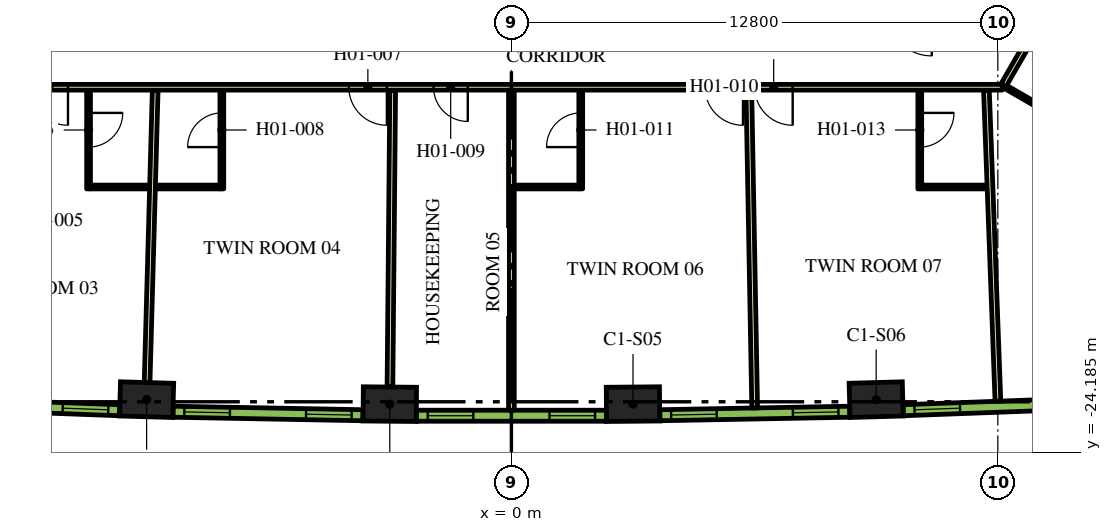
"""IFC4 building model, lengths in metres.
Left out: names, types, materials, properties, quantities, classifications, styles, units other than length and angle.
Written with IfcOpenShell. Run it as: python <this file> out.ifc"""

import sys

from ifc_helpers import new_model, si_unit, direction, frame, frame_2d, origin, origin_2d, place, context, subcontext, project, spatial, rectangle, extrude, element, fill, save


model = new_model("IFC4")
c1 = context("Model", 3, precision=1e-05, world=origin(), true_north=direction((0.0, 1.0)))
c2 = subcontext(c1, "Body", "Model", "MODEL_VIEW")
j1 = project(units=[si_unit("LENGTHUNIT", "METRE"), si_unit("PLANEANGLEUNIT", "RADIAN")], contexts=[c1])
p1 = place(None, origin())
s1 = spatial("IfcSite", under=j1, at=p1, CompositionType="ELEMENT")
p2 = place(p1, origin())
s2 = spatial("IfcBuilding", under=s1, at=p2, CompositionType="ELEMENT")
p3 = place(p2, frame((0.0, 0.0, 31.5)))
s3 = spatial("IfcBuildingStorey", under=s2, at=p3, CompositionType="ELEMENT", Elevation=31.5)
for number, where, z_axis, x_axis in (
    (1, (-9.599, -22.795, 0.0), (0.0, 0.0, 1.0), (1.0, -0.028, 0.0)),
    (2, (-3.2, -22.913, 0.0), (0.0, 0.0, 1.0), (1.0, -0.009, 0.0)),
    (3, (3.2, -22.913, 0.0), (0.0, 0.0, 1.0), (1.0, 0.009, 0.0)),
    (4, (9.599, -22.795, 0.0), (0.0, 0.0, 1.0), (1.0, 0.028, 0.0)),
):
    element("IfcColumn", number, at=place(p3, frame(where, z_axis=z_axis, x_axis=x_axis)), inside=s3, PredefinedType="COLUMN", context=c2, shape_type="SweptSolid", body=[
        extrude(rectangle(XDim=1.4, YDim=0.9, at=origin_2d()), origin(), (0.0, 0.0, 1.0), 3.9),
    ])
p4 = place(p3, frame((12.918, -14.575, 0.0), z_axis=(0.0, 0.0, 1.0), x_axis=(-1.0, 0.0, 0.0)))
e5 = element("IfcWall", 5, at=p4, inside=s3, PredefinedType="PARTITIONING", context=c2, shape_type="SweptSolid", body=[
    extrude(rectangle(XDim=25.766, YDim=0.15, at=frame_2d((12.883, 0.0))), origin(), (0.0, 0.0, 1.0), 2.75),
])
p5 = place(p4, frame((24.586, 0.0, 0.0)))
e6 = element("IfcOpeningElement", 6, at=p5, cuts=e5, PredefinedType="OPENING", context=c2, shape_type="SweptSolid", body=[
    extrude(rectangle(XDim=1.0, YDim=2.1, at=frame_2d((0.5, 1.05))), frame((0.0, 0.085, 0.0), z_axis=(0.0, -1.0, 0.0), x_axis=(1.0, 0.0, 0.0)), (0.0, 0.0, 1.0), 0.17),
])
p6 = place(p4, frame((16.195, 0.0, 0.0)))
e7 = element("IfcOpeningElement", 7, at=p6, cuts=e5, PredefinedType="OPENING", context=c2, shape_type="SweptSolid", body=[
    extrude(rectangle(XDim=1.0, YDim=2.1, at=frame_2d((0.5, 1.05))), frame((0.0, 0.085, 0.0), z_axis=(0.0, -1.0, 0.0), x_axis=(1.0, 0.0, 0.0)), (0.0, 0.0, 1.0), 0.17),
])
p7 = place(p4, frame((14.066, 0.0, 0.0)))
e8 = element("IfcOpeningElement", 8, at=p7, cuts=e5, PredefinedType="OPENING", context=c2, shape_type="SweptSolid", body=[
    extrude(rectangle(XDim=0.9, YDim=2.1, at=frame_2d((0.45, 1.05))), frame((0.0, 0.085, 0.0), z_axis=(0.0, -1.0, 0.0), x_axis=(1.0, 0.0, 0.0)), (0.0, 0.0, 1.0), 0.17),
])
p8 = place(p4, frame((6.824, 0.0, 0.0)))
e9 = element("IfcOpeningElement", 9, at=p8, cuts=e5, PredefinedType="OPENING", context=c2, shape_type="SweptSolid", body=[
    extrude(rectangle(XDim=1.0, YDim=2.1, at=frame_2d((0.5, 1.05))), frame((0.0, 0.085, 0.0), z_axis=(0.0, -1.0, 0.0), x_axis=(1.0, 0.0, 0.0)), (0.0, 0.0, 1.0), 0.17),
])
p9 = place(p4, frame((5.517, 0.0, 0.0)))
e10 = element("IfcOpeningElement", 10, at=p9, cuts=e5, PredefinedType="OPENING", context=c2, shape_type="SweptSolid", body=[
    extrude(rectangle(XDim=1.0, YDim=2.1, at=frame_2d((0.5, 1.05))), frame((0.0, 0.085, 0.0), z_axis=(0.0, -1.0, 0.0), x_axis=(1.0, 0.0, 0.0)), (0.0, 0.0, 1.0), 0.17),
])
p10 = place(p3, frame((15.587, -9.952, 0.0), z_axis=(0.0, 0.0, 1.0), x_axis=(-0.500016618951, -0.866015808616, 0.0)))
e11 = element("IfcWall", 11, at=p10, inside=s3, PredefinedType="PARTITIONING", context=c2, shape_type="SweptSolid", body=[
    extrude(rectangle(XDim=5.268, YDim=0.15, at=frame_2d((2.634, 0.0))), origin(), (0.0, 0.0, 1.0), 2.75),
])
p11 = place(p10, frame((0.225, 0.0, 0.0)))
e12 = element("IfcOpeningElement", 12, at=p11, cuts=e11, PredefinedType="OPENING", context=c2, shape_type="SweptSolid", body=[
    extrude(rectangle(XDim=1.0, YDim=2.1, at=frame_2d((0.5, 1.05))), frame((0.0, 0.085, 0.0), z_axis=(0.0, -1.0, 0.0), x_axis=(1.0, 0.0, 0.0)), (0.0, 0.0, 1.0), 0.17),
])
p12 = place(p3, frame((-9.586, -22.345, 0.0), z_axis=(0.0, 0.0, 1.0), x_axis=(0.027722115646, 0.999615668297, 0.0)))
e13 = element("IfcWall", 13, at=p12, inside=s3, PredefinedType="PARTITIONING", context=c2, shape_type="SweptSolid", body=[
    extrude(rectangle(XDim=7.688, YDim=0.15, at=frame_2d((3.844, 0.0))), origin(), (0.0, 0.0, 1.0), 2.75),
])
p13 = place(p3, frame((-3.196, -22.463, 0.0), z_axis=(0.0, 0.0, 1.0), x_axis=(0.00926060032, 0.999957119721, 0.0)))
e14 = element("IfcWall", 14, at=p13, inside=s3, PredefinedType="PARTITIONING", context=c2, shape_type="SweptSolid", body=[
    extrude(rectangle(XDim=7.803, YDim=0.15, at=frame_2d((3.902, 0.0))), origin(), (0.0, 0.0, 1.0), 2.75),
])
p14 = place(p3, frame((0.0, -23.073, 0.0), z_axis=(0.0, 0.0, 1.0), x_axis=(0.0, 1.0, 0.0)))
e15 = element("IfcWall", 15, at=p14, inside=s3, PredefinedType="PARTITIONING", context=c2, shape_type="SweptSolid", body=[
    extrude(rectangle(XDim=8.423, YDim=0.15, at=frame_2d((4.212, 0.0))), origin(), (0.0, 0.0, 1.0), 2.75),
])
p15 = place(p3, frame((6.402, -23.014, 0.0), z_axis=(0.0, 0.0, 1.0), x_axis=(-0.01849587109, 0.999828936745, 0.0)))
e16 = element("IfcWall", 16, at=p15, inside=s3, PredefinedType="PARTITIONING", context=c2, shape_type="SweptSolid", body=[
    extrude(rectangle(XDim=8.355, YDim=0.15, at=frame_2d((4.178, 0.0))), origin(), (0.0, 0.0, 1.0), 2.75),
])
p16 = place(p3, frame((12.802, -22.836, 0.0), z_axis=(0.0, 0.0, 1.0), x_axis=(-0.036969723281, 0.999316386116, 0.0)))
e17 = element("IfcWall", 17, at=p16, inside=s3, PredefinedType="PARTITIONING", context=c2, shape_type="SweptSolid", body=[
    extrude(rectangle(XDim=8.182, YDim=0.15, at=frame_2d((4.091, 0.0))), origin(), (0.0, 0.0, 1.0), 2.75),
])
p17 = place(p3, frame((-11.127, -14.65, 0.0), z_axis=(0.0, 0.0, 1.0), x_axis=(0.0, -1.0, 0.0)))
e18 = element("IfcWall", 18, at=p17, inside=s3, PredefinedType="PARTITIONING", context=c2, shape_type="SweptSolid", body=[
    extrude(rectangle(XDim=2.6, YDim=0.1, at=frame_2d((1.3, 0.0))), origin(), (0.0, 0.0, 1.0), 2.75),
])
p18 = place(p17, frame((0.6, 0.0, 0.0)))
e19 = element("IfcOpeningElement", 19, at=p18, cuts=e18, PredefinedType="OPENING", context=c2, shape_type="SweptSolid", body=[
    extrude(rectangle(XDim=0.9, YDim=2.1, at=frame_2d((0.45, 1.05))), frame((0.0, 0.06, 0.0), z_axis=(0.0, -1.0, 0.0), x_axis=(1.0, 0.0, 0.0)), (0.0, 0.0, 1.0), 0.12),
])
p19 = place(p3, frame((-11.077, -17.2, 0.0), z_axis=(0.0, 0.0, 1.0), x_axis=(1.0, 0.0, 0.0)))
e20 = element("IfcWall", 20, at=p19, inside=s3, PredefinedType="PARTITIONING", context=c2, shape_type="SweptSolid", body=[
    extrude(rectangle(XDim=1.55, YDim=0.1, at=frame_2d((0.775, 0.0))), origin(), (0.0, 0.0, 1.0), 2.75),
])
p20 = place(p3, frame((-7.619, -17.25, 0.0), z_axis=(0.0, 0.0, 1.0), x_axis=(0.0, 1.0, 0.0)))
e21 = element("IfcWall", 21, at=p20, inside=s3, PredefinedType="PARTITIONING", context=c2, shape_type="SweptSolid", body=[
    extrude(rectangle(XDim=2.6, YDim=0.1, at=frame_2d((1.3, 0.0))), origin(), (0.0, 0.0, 1.0), 2.75),
])
p21 = place(p20, frame((1.1, 0.0, 0.0)))
e22 = element("IfcOpeningElement", 22, at=p21, cuts=e21, PredefinedType="OPENING", context=c2, shape_type="SweptSolid", body=[
    extrude(rectangle(XDim=0.9, YDim=2.1, at=frame_2d((0.45, 1.05))), frame((0.0, 0.06, 0.0), z_axis=(0.0, -1.0, 0.0), x_axis=(1.0, 0.0, 0.0)), (0.0, 0.0, 1.0), 0.12),
])
p22 = place(p3, frame((-7.669, -17.2, 0.0), z_axis=(0.0, 0.0, 1.0), x_axis=(-1.0, 0.0, 0.0)))
e23 = element("IfcWall", 23, at=p22, inside=s3, PredefinedType="PARTITIONING", context=c2, shape_type="SweptSolid", body=[
    extrude(rectangle(XDim=1.69, YDim=0.1, at=frame_2d((0.845, 0.0))), origin(), (0.0, 0.0, 1.0), 2.75),
])
p23 = place(p3, frame((1.825, -17.25, 0.0), z_axis=(0.0, 0.0, 1.0), x_axis=(0.0, 1.0, 0.0)))
e24 = element("IfcWall", 24, at=p23, inside=s3, PredefinedType="PARTITIONING", context=c2, shape_type="SweptSolid", body=[
    extrude(rectangle(XDim=2.6, YDim=0.1, at=frame_2d((1.3, 0.0))), origin(), (0.0, 0.0, 1.0), 2.75),
])
p24 = place(p23, frame((1.1, 0.0, 0.0)))
e25 = element("IfcOpeningElement", 25, at=p24, cuts=e24, PredefinedType="OPENING", context=c2, shape_type="SweptSolid", body=[
    extrude(rectangle(XDim=0.9, YDim=2.1, at=frame_2d((0.45, 1.05))), frame((0.0, 0.06, 0.0), z_axis=(0.0, -1.0, 0.0), x_axis=(1.0, 0.0, 0.0)), (0.0, 0.0, 1.0), 0.12),
])
p25 = place(p3, frame((1.775, -17.2, 0.0), z_axis=(0.0, 0.0, 1.0), x_axis=(-1.0, 0.0, 0.0)))
e26 = element("IfcWall", 26, at=p25, inside=s3, PredefinedType="PARTITIONING", context=c2, shape_type="SweptSolid", body=[
    extrude(rectangle(XDim=1.7, YDim=0.1, at=frame_2d((0.85, 0.0))), origin(), (0.0, 0.0, 1.0), 2.75),
])
p26 = place(p3, frame((10.746, -14.65, 0.0), z_axis=(0.0, 0.0, 1.0), x_axis=(0.0, -1.0, 0.0)))
e27 = element("IfcWall", 27, at=p26, inside=s3, PredefinedType="PARTITIONING", context=c2, shape_type="SweptSolid", body=[
    extrude(rectangle(XDim=2.6, YDim=0.1, at=frame_2d((1.3, 0.0))), origin(), (0.0, 0.0, 1.0), 2.75),
])
p27 = place(p26, frame((0.6, 0.0, 0.0)))
e28 = element("IfcOpeningElement", 28, at=p27, cuts=e27, PredefinedType="OPENING", context=c2, shape_type="SweptSolid", body=[
    extrude(rectangle(XDim=0.9, YDim=2.1, at=frame_2d((0.45, 1.05))), frame((0.0, 0.06, 0.0), z_axis=(0.0, -1.0, 0.0), x_axis=(1.0, 0.0, 0.0)), (0.0, 0.0, 1.0), 0.12),
])
p28 = place(p3, frame((10.806, -17.2, 0.0), z_axis=(0.0, 0.0, 1.0), x_axis=(1.0, 0.0, 0.0)))
e29 = element("IfcWall", 29, at=p28, inside=s3, PredefinedType="PARTITIONING", context=c2, shape_type="SweptSolid", body=[
    extrude(rectangle(XDim=1.71, YDim=0.1, at=frame_2d((0.855, 0.0))), origin(), (0.0, 0.0, 1.0), 2.75),
])
p29 = place(p3, frame((13.008, -14.569, 0.0), z_axis=(0.0, 0.0, 1.0), x_axis=(0.865997922154, -0.500047596559, 0.0)))
e30 = element("IfcWall", 30, at=p29, inside=s3, PredefinedType="PARTITIONING", context=c2, shape_type="SweptSolid", body=[
    extrude(rectangle(XDim=2.6, YDim=0.1, at=frame_2d((1.3, 0.0))), origin(), (0.0, 0.0, 1.0), 2.75),
])
p30 = place(p3, frame((-15.305, -22.889, 0.0), z_axis=(0.0, 0.0, 1.0), x_axis=(0.999317974969, -0.036926750529, 0.0)))
e31 = element("IfcWall", 31, at=p30, inside=s3, PredefinedType="SOLIDWALL", context=c2, shape_type="SweptSolid", body=[
    extrude(rectangle(XDim=4.998, YDim=0.29, at=frame_2d((2.499, 0.0))), origin(), (0.0, 0.0, 1.0), 3.65),
])
p31 = place(p30, frame((0.297, 0.0, 0.9)))
e32 = element("IfcOpeningElement", 32, at=p31, cuts=e31, PredefinedType="OPENING", context=c2, shape_type="SweptSolid", body=[
    extrude(rectangle(XDim=1.2, YDim=2.15, at=frame_2d((0.6, 1.075))), frame((0.0, 0.155, 0.0), z_axis=(0.0, -1.0, 0.0), x_axis=(1.0, 0.0, 0.0)), (0.0, 0.0, 1.0), 0.31),
])
p32 = place(p30, frame((3.501, 0.0, 0.9)))
e33 = element("IfcOpeningElement", 33, at=p32, cuts=e31, PredefinedType="OPENING", context=c2, shape_type="SweptSolid", body=[
    extrude(rectangle(XDim=1.2, YDim=2.15, at=frame_2d((0.6, 1.075))), frame((0.0, 0.155, 0.0), z_axis=(0.0, -1.0, 0.0), x_axis=(1.0, 0.0, 0.0)), (0.0, 0.0, 1.0), 0.31),
])
p33 = place(p3, frame((-8.904, -23.113, 0.0), z_axis=(0.0, 0.0, 1.0), x_axis=(0.999829529479, -0.018463801951, 0.0)))
e34 = element("IfcWall", 34, at=p33, inside=s3, PredefinedType="SOLIDWALL", context=c2, shape_type="SweptSolid", body=[
    extrude(rectangle(XDim=4.998, YDim=0.29, at=frame_2d((2.499, 0.0))), origin(), (0.0, 0.0, 1.0), 3.65),
])
p34 = place(p33, frame((0.297, 0.0, 0.9)))
e35 = element("IfcOpeningElement", 35, at=p34, cuts=e34, PredefinedType="OPENING", context=c2, shape_type="SweptSolid", body=[
    extrude(rectangle(XDim=1.2, YDim=2.15, at=frame_2d((0.6, 1.075))), frame((0.0, 0.155, 0.0), z_axis=(0.0, -1.0, 0.0), x_axis=(1.0, 0.0, 0.0)), (0.0, 0.0, 1.0), 0.31),
])
p35 = place(p33, frame((3.501, 0.0, 0.9)))
e36 = element("IfcOpeningElement", 36, at=p35, cuts=e34, PredefinedType="OPENING", context=c2, shape_type="SweptSolid", body=[
    extrude(rectangle(XDim=1.2, YDim=2.15, at=frame_2d((0.6, 1.075))), frame((0.0, 0.155, 0.0), z_axis=(0.0, -1.0, 0.0), x_axis=(1.0, 0.0, 0.0)), (0.0, 0.0, 1.0), 0.31),
])
p36 = place(p3, frame((-2.499, -23.218, 0.0), z_axis=(0.0, 0.0, 1.0), x_axis=(1.0, 0.0, 0.0)))
e37 = element("IfcWall", 37, at=p36, inside=s3, PredefinedType="SOLIDWALL", context=c2, shape_type="SweptSolid", body=[
    extrude(rectangle(XDim=4.998, YDim=0.29, at=frame_2d((2.499, 0.0))), origin(), (0.0, 0.0, 1.0), 3.65),
])
p37 = place(p36, frame((0.297, 0.0, 0.9)))
e38 = element("IfcOpeningElement", 38, at=p37, cuts=e37, PredefinedType="OPENING", context=c2, shape_type="SweptSolid", body=[
    extrude(rectangle(XDim=1.2, YDim=2.15, at=frame_2d((0.6, 1.075))), frame((0.0, 0.155, 0.0), z_axis=(0.0, -1.0, 0.0), x_axis=(1.0, 0.0, 0.0)), (0.0, 0.0, 1.0), 0.31),
])
p38 = place(p36, frame((3.501, 0.0, 0.9)))
e39 = element("IfcOpeningElement", 39, at=p38, cuts=e37, PredefinedType="OPENING", context=c2, shape_type="SweptSolid", body=[
    extrude(rectangle(XDim=1.2, YDim=2.15, at=frame_2d((0.6, 1.075))), frame((0.0, 0.155, 0.0), z_axis=(0.0, -1.0, 0.0), x_axis=(1.0, 0.0, 0.0)), (0.0, 0.0, 1.0), 0.31),
])
p39 = place(p3, frame((3.906, -23.205, 0.0), z_axis=(0.0, 0.0, 1.0), x_axis=(0.999829529479, 0.018463801951, 0.0)))
e40 = element("IfcWall", 40, at=p39, inside=s3, PredefinedType="SOLIDWALL", context=c2, shape_type="SweptSolid", body=[
    extrude(rectangle(XDim=4.998, YDim=0.29, at=frame_2d((2.499, 0.0))), origin(), (0.0, 0.0, 1.0), 3.65),
])
p40 = place(p39, frame((0.297, 0.0, 0.9)))
e41 = element("IfcOpeningElement", 41, at=p40, cuts=e40, PredefinedType="OPENING", context=c2, shape_type="SweptSolid", body=[
    extrude(rectangle(XDim=1.2, YDim=2.15, at=frame_2d((0.6, 1.075))), frame((0.0, 0.155, 0.0), z_axis=(0.0, -1.0, 0.0), x_axis=(1.0, 0.0, 0.0)), (0.0, 0.0, 1.0), 0.31),
])
p41 = place(p39, frame((3.501, 0.0, 0.9)))
e42 = element("IfcOpeningElement", 42, at=p41, cuts=e40, PredefinedType="OPENING", context=c2, shape_type="SweptSolid", body=[
    extrude(rectangle(XDim=1.2, YDim=2.15, at=frame_2d((0.6, 1.075))), frame((0.0, 0.155, 0.0), z_axis=(0.0, -1.0, 0.0), x_axis=(1.0, 0.0, 0.0)), (0.0, 0.0, 1.0), 0.31),
])
p42 = place(p3, frame((10.31, -23.074, 0.0), z_axis=(0.0, 0.0, 1.0), x_axis=(0.999317974969, 0.036926750529, 0.0)))
e43 = element("IfcWall", 43, at=p42, inside=s3, PredefinedType="SOLIDWALL", context=c2, shape_type="SweptSolid", body=[
    extrude(rectangle(XDim=4.998, YDim=0.29, at=frame_2d((2.499, 0.0))), origin(), (0.0, 0.0, 1.0), 3.65),
])
p43 = place(p42, frame((0.297, 0.0, 0.9)))
e44 = element("IfcOpeningElement", 44, at=p43, cuts=e43, PredefinedType="OPENING", context=c2, shape_type="SweptSolid", body=[
    extrude(rectangle(XDim=1.2, YDim=2.15, at=frame_2d((0.6, 1.075))), frame((0.0, 0.155, 0.0), z_axis=(0.0, -1.0, 0.0), x_axis=(1.0, 0.0, 0.0)), (0.0, 0.0, 1.0), 0.31),
])
p44 = place(p42, frame((3.501, 0.0, 0.9)))
e45 = element("IfcOpeningElement", 45, at=p44, cuts=e43, PredefinedType="OPENING", context=c2, shape_type="SweptSolid", body=[
    extrude(rectangle(XDim=1.2, YDim=2.15, at=frame_2d((0.6, 1.075))), frame((0.0, 0.155, 0.0), z_axis=(0.0, -1.0, 0.0), x_axis=(1.0, 0.0, 0.0)), (0.0, 0.0, 1.0), 0.31),
])
p45 = place(p5, origin())
e46 = element("IfcDoor", 46, at=p45, inside=s3, OperationType="SINGLE_SWING_RIGHT", PredefinedType="DOOR", context=c2, shape_type="SweptSolid", body=[
    extrude(rectangle(XDim=1.0, YDim=2.1, at=frame_2d((0.5, 1.05))), frame((0.0, 0.025, 0.0), z_axis=(0.0, -1.0, 0.0), x_axis=(1.0, 0.0, 0.0)), (0.0, 0.0, 1.0), 0.05),
])
fill(e6, e46)
p46 = place(p18, origin())
e47 = element("IfcDoor", 47, at=p46, inside=s3, OperationType="SINGLE_SWING_RIGHT", PredefinedType="DOOR", context=c2, shape_type="SweptSolid", body=[
    extrude(rectangle(XDim=0.9, YDim=2.1, at=frame_2d((0.45, 1.05))), frame((0.0, 0.025, 0.0), z_axis=(0.0, -1.0, 0.0), x_axis=(1.0, 0.0, 0.0)), (0.0, 0.0, 1.0), 0.05),
])
fill(e19, e47)
p47 = place(p6, origin())
e48 = element("IfcDoor", 48, at=p47, inside=s3, OperationType="SINGLE_SWING_LEFT", PredefinedType="DOOR", context=c2, shape_type="SweptSolid", body=[
    extrude(rectangle(XDim=1.0, YDim=2.1, at=frame_2d((0.5, 1.05))), frame((0.0, 0.025, 0.0), z_axis=(0.0, -1.0, 0.0), x_axis=(1.0, 0.0, 0.0)), (0.0, 0.0, 1.0), 0.05),
])
fill(e7, e48)
p48 = place(p21, origin())
e49 = element("IfcDoor", 49, at=p48, inside=s3, OperationType="SINGLE_SWING_LEFT", PredefinedType="DOOR", context=c2, shape_type="SweptSolid", body=[
    extrude(rectangle(XDim=0.9, YDim=2.1, at=frame_2d((0.45, 1.05))), frame((0.0, 0.025, 0.0), z_axis=(0.0, -1.0, 0.0), x_axis=(1.0, 0.0, 0.0)), (0.0, 0.0, 1.0), 0.05),
])
fill(e22, e49)
p49 = place(p7, origin())
e50 = element("IfcDoor", 50, at=p49, inside=s3, OperationType="SINGLE_SWING_LEFT", PredefinedType="DOOR", context=c2, shape_type="SweptSolid", body=[
    extrude(rectangle(XDim=0.9, YDim=2.1, at=frame_2d((0.45, 1.05))), frame((0.0, 0.025, 0.0), z_axis=(0.0, -1.0, 0.0), x_axis=(1.0, 0.0, 0.0)), (0.0, 0.0, 1.0), 0.05),
])
fill(e8, e50)
p50 = place(p8, origin())
e51 = element("IfcDoor", 51, at=p50, inside=s3, OperationType="SINGLE_SWING_LEFT", PredefinedType="DOOR", context=c2, shape_type="SweptSolid", body=[
    extrude(rectangle(XDim=1.0, YDim=2.1, at=frame_2d((0.5, 1.05))), frame((0.0, 0.025, 0.0), z_axis=(0.0, -1.0, 0.0), x_axis=(1.0, 0.0, 0.0)), (0.0, 0.0, 1.0), 0.05),
])
fill(e9, e51)
p51 = place(p24, origin())
e52 = element("IfcDoor", 52, at=p51, inside=s3, OperationType="SINGLE_SWING_RIGHT", PredefinedType="DOOR", context=c2, shape_type="SweptSolid", body=[
    extrude(rectangle(XDim=0.9, YDim=2.1, at=frame_2d((0.45, 1.05))), frame((0.0, 0.025, 0.0), z_axis=(0.0, -1.0, 0.0), x_axis=(1.0, 0.0, 0.0)), (0.0, 0.0, 1.0), 0.05),
])
fill(e25, e52)
p52 = place(p9, origin())
e53 = element("IfcDoor", 53, at=p52, inside=s3, OperationType="SINGLE_SWING_RIGHT", PredefinedType="DOOR", context=c2, shape_type="SweptSolid", body=[
    extrude(rectangle(XDim=1.0, YDim=2.1, at=frame_2d((0.5, 1.05))), frame((0.0, 0.025, 0.0), z_axis=(0.0, -1.0, 0.0), x_axis=(1.0, 0.0, 0.0)), (0.0, 0.0, 1.0), 0.05),
])
fill(e10, e53)
p53 = place(p27, origin())
e54 = element("IfcDoor", 54, at=p53, inside=s3, OperationType="SINGLE_SWING_LEFT", PredefinedType="DOOR", context=c2, shape_type="SweptSolid", body=[
    extrude(rectangle(XDim=0.9, YDim=2.1, at=frame_2d((0.45, 1.05))), frame((0.0, 0.025, 0.0), z_axis=(0.0, -1.0, 0.0), x_axis=(1.0, 0.0, 0.0)), (0.0, 0.0, 1.0), 0.05),
])
fill(e28, e54)
p54 = place(p32, origin())
e55 = element("IfcWindow", 55, at=p54, inside=s3, PartitioningType="DOUBLE_PANEL_VERTICAL", PredefinedType="WINDOW", context=c2, shape_type="SweptSolid", body=[
    extrude(rectangle(XDim=1.2, YDim=2.15, at=frame_2d((0.6, 1.075))), frame((0.0, 0.015, 0.0), z_axis=(0.0, -1.0, 0.0), x_axis=(1.0, 0.0, 0.0)), (0.0, 0.0, 1.0), 0.06),
])
fill(e33, e55)
p55 = place(p34, origin())
e56 = element("IfcWindow", 56, at=p55, inside=s3, PartitioningType="DOUBLE_PANEL_VERTICAL", PredefinedType="WINDOW", context=c2, shape_type="SweptSolid", body=[
    extrude(rectangle(XDim=1.2, YDim=2.15, at=frame_2d((0.6, 1.075))), frame((0.0, 0.015, 0.0), z_axis=(0.0, -1.0, 0.0), x_axis=(1.0, 0.0, 0.0)), (0.0, 0.0, 1.0), 0.06),
])
fill(e35, e56)
p56 = place(p35, origin())
e57 = element("IfcWindow", 57, at=p56, inside=s3, PartitioningType="DOUBLE_PANEL_VERTICAL", PredefinedType="WINDOW", context=c2, shape_type="SweptSolid", body=[
    extrude(rectangle(XDim=1.2, YDim=2.15, at=frame_2d((0.6, 1.075))), frame((0.0, 0.015, 0.0), z_axis=(0.0, -1.0, 0.0), x_axis=(1.0, 0.0, 0.0)), (0.0, 0.0, 1.0), 0.06),
])
fill(e36, e57)
p57 = place(p37, origin())
e58 = element("IfcWindow", 58, at=p57, inside=s3, PartitioningType="DOUBLE_PANEL_VERTICAL", PredefinedType="WINDOW", context=c2, shape_type="SweptSolid", body=[
    extrude(rectangle(XDim=1.2, YDim=2.15, at=frame_2d((0.6, 1.075))), frame((0.0, 0.015, 0.0), z_axis=(0.0, -1.0, 0.0), x_axis=(1.0, 0.0, 0.0)), (0.0, 0.0, 1.0), 0.06),
])
fill(e38, e58)
p58 = place(p38, origin())
e59 = element("IfcWindow", 59, at=p58, inside=s3, PartitioningType="DOUBLE_PANEL_VERTICAL", PredefinedType="WINDOW", context=c2, shape_type="SweptSolid", body=[
    extrude(rectangle(XDim=1.2, YDim=2.15, at=frame_2d((0.6, 1.075))), frame((0.0, 0.015, 0.0), z_axis=(0.0, -1.0, 0.0), x_axis=(1.0, 0.0, 0.0)), (0.0, 0.0, 1.0), 0.06),
])
fill(e39, e59)
p59 = place(p40, origin())
e60 = element("IfcWindow", 60, at=p59, inside=s3, PartitioningType="DOUBLE_PANEL_VERTICAL", PredefinedType="WINDOW", context=c2, shape_type="SweptSolid", body=[
    extrude(rectangle(XDim=1.2, YDim=2.15, at=frame_2d((0.6, 1.075))), frame((0.0, 0.015, 0.0), z_axis=(0.0, -1.0, 0.0), x_axis=(1.0, 0.0, 0.0)), (0.0, 0.0, 1.0), 0.06),
])
fill(e41, e60)
p60 = place(p41, origin())
e61 = element("IfcWindow", 61, at=p60, inside=s3, PartitioningType="DOUBLE_PANEL_VERTICAL", PredefinedType="WINDOW", context=c2, shape_type="SweptSolid", body=[
    extrude(rectangle(XDim=1.2, YDim=2.15, at=frame_2d((0.6, 1.075))), frame((0.0, 0.015, 0.0), z_axis=(0.0, -1.0, 0.0), x_axis=(1.0, 0.0, 0.0)), (0.0, 0.0, 1.0), 0.06),
])
fill(e42, e61)
p61 = place(p43, origin())
e62 = element("IfcWindow", 62, at=p61, inside=s3, PartitioningType="DOUBLE_PANEL_VERTICAL", PredefinedType="WINDOW", context=c2, shape_type="SweptSolid", body=[
    extrude(rectangle(XDim=1.2, YDim=2.15, at=frame_2d((0.6, 1.075))), frame((0.0, 0.015, 0.0), z_axis=(0.0, -1.0, 0.0), x_axis=(1.0, 0.0, 0.0)), (0.0, 0.0, 1.0), 0.06),
])
fill(e44, e62)
save(model, sys.argv[1])
